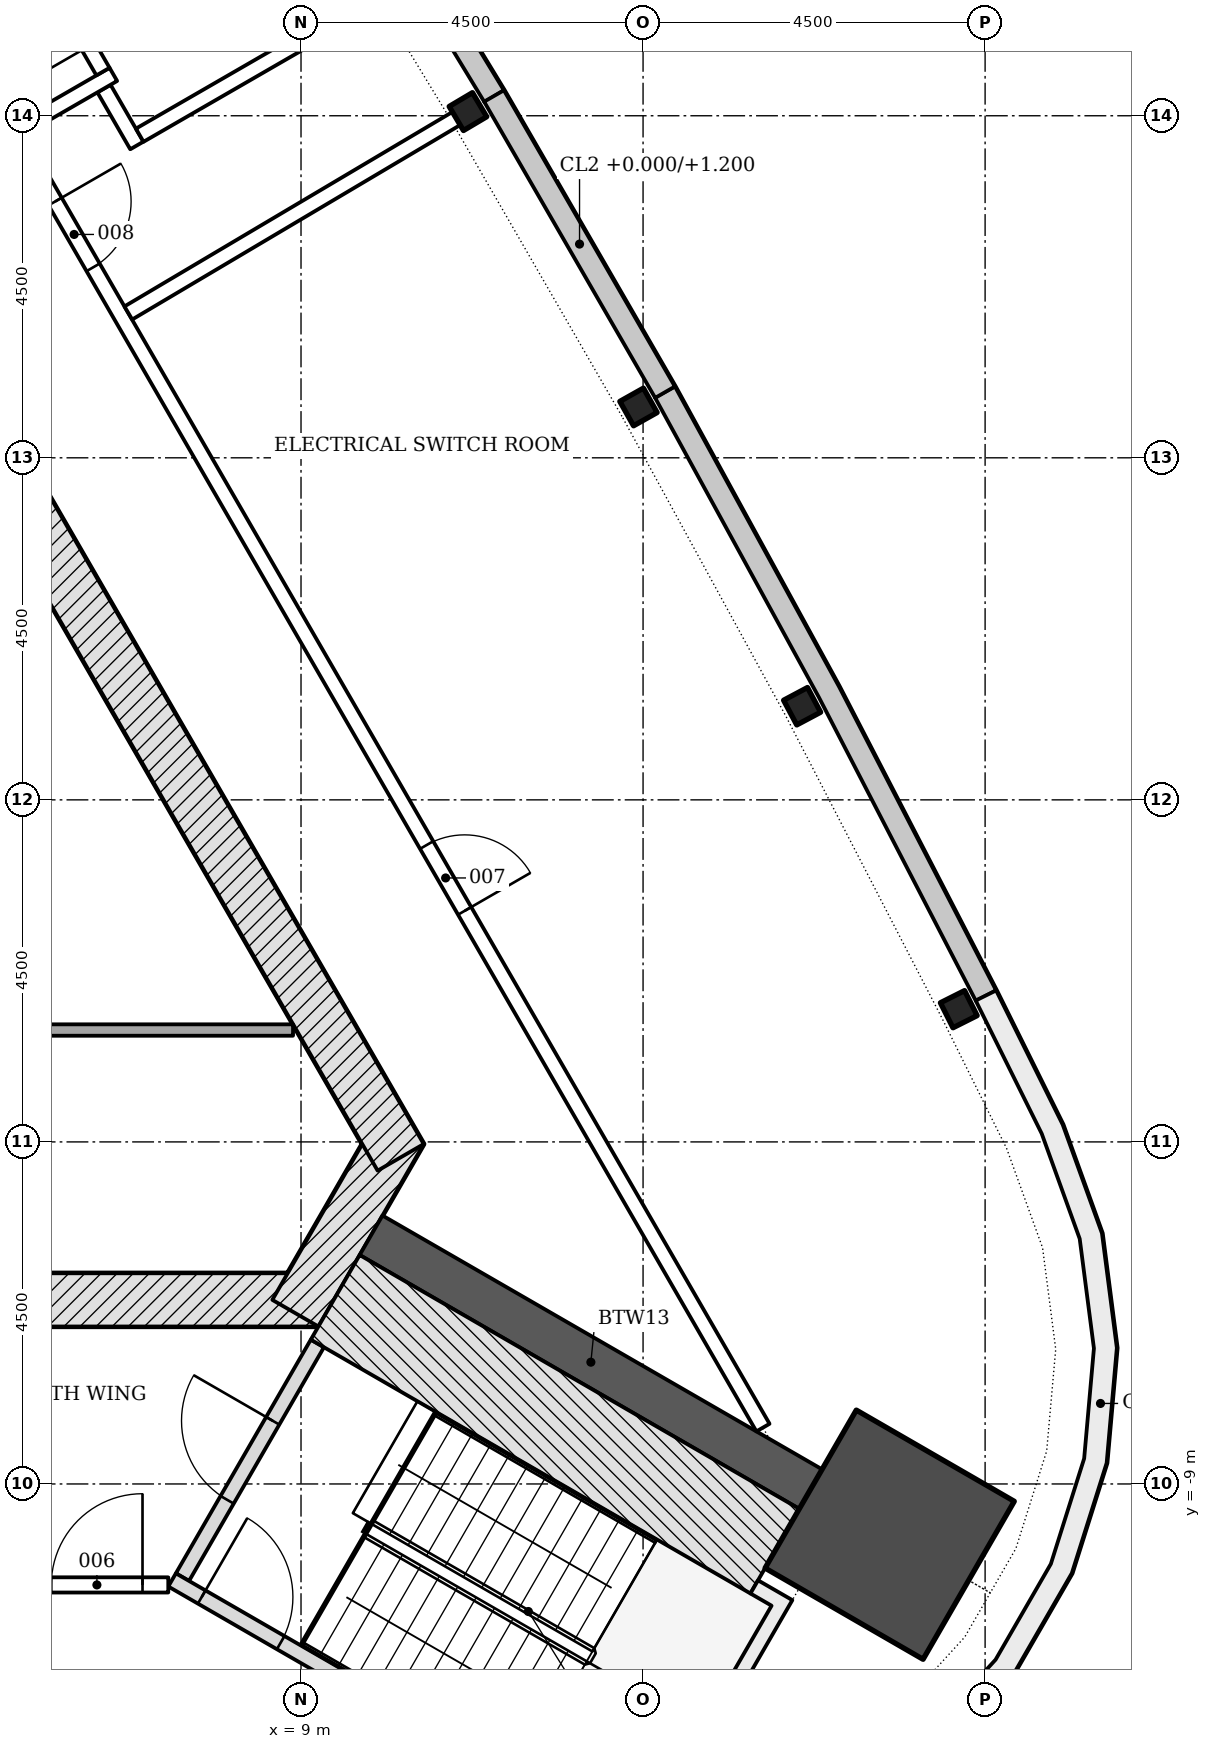
"""IFC4 building model, lengths in metres.
Left out: names, types, materials, properties, quantities, classifications, styles, units other than length and angle.
Written with IfcOpenShell. Run it as: python <this file> out.ifc"""

import sys

from ifc_helpers import new_model, si_unit, direction, frame, frame_2d, origin, origin_2d, place, context, subcontext, project, spatial, polyline, rectangle, i_section, outline, extrude, element, fill, save


model = new_model("IFC4")
c1 = context("Model", 3, precision=1e-05, world=origin(), true_north=direction((0.0, 1.0)))
c2 = subcontext(c1, "Body", "Model", "MODEL_VIEW")
j1 = project(units=[si_unit("LENGTHUNIT", "METRE"), si_unit("PLANEANGLEUNIT", "RADIAN")], contexts=[c1])
p1 = place(None, origin())
s1 = spatial("IfcSite", under=j1, at=p1, CompositionType="ELEMENT")
p2 = place(p1, origin())
s2 = spatial("IfcBuilding", under=s1, at=p2, CompositionType="ELEMENT")
p3 = place(p2, frame((0.0, 0.0, 279.6)))
s3 = spatial("IfcBuildingStorey", under=s2, at=p3, CompositionType="ELEMENT", Elevation=279.6)
p4 = place(p3, frame((-9.229, -6.578, -0.25), z_axis=(0.0, 0.0, 1.0), x_axis=(1.0, 0.0, 0.0)))
e1 = element("IfcWall", 1, at=p4, inside=s3, PredefinedType="SHEAR", context=c2, shape_type="SweptSolid", body=[
    extrude(rectangle(XDim=18.458, YDim=0.7, at=frame_2d((9.229, 0.0))), origin(), (0.0, 0.0, 1.0), 4.5),
])
p5 = place(p4, frame((8.7, 0.0, 0.25)))
e2 = element("IfcOpeningElement", 2, at=p5, cuts=e1, PredefinedType="OPENING", context=c2, shape_type="SweptSolid", body=[
    extrude(rectangle(XDim=1.0, YDim=2.1, at=frame_2d((0.5, 1.05))), frame((0.0, 0.36, 0.0), z_axis=(0.0, -1.0, 0.0), x_axis=(1.0, 0.0, 0.0)), (0.0, 0.0, 1.0), 0.72),
])
p6 = place(p4, frame((3.99, 0.0, 0.25)))
e3 = element("IfcOpeningElement", 3, at=p6, cuts=e1, PredefinedType="OPENING", context=c2, shape_type="SweptSolid", body=[
    extrude(rectangle(XDim=0.9, YDim=2.1, at=frame_2d((0.45, 1.05))), frame((0.0, 0.36, 0.0), z_axis=(0.0, -1.0, 0.0), x_axis=(1.0, 0.0, 0.0)), (0.0, 0.0, 1.0), 0.72),
])
p7 = place(p4, frame((13.539, 0.0, 0.25)))
e4 = element("IfcOpeningElement", 4, at=p7, cuts=e1, PredefinedType="OPENING", context=c2, shape_type="SweptSolid", body=[
    extrude(rectangle(XDim=0.9, YDim=2.1, at=frame_2d((0.45, 1.05))), frame((0.0, 0.36, 0.0), z_axis=(0.0, -1.0, 0.0), x_axis=(1.0, 0.0, 0.0)), (0.0, 0.0, 1.0), 0.72),
])
p8 = place(p3, frame((8.926, -6.753, -0.25), z_axis=(0.0, 0.0, 1.0), x_axis=(0.500042739161, 0.866000726912, 0.0)))
e5 = element("IfcWall", 5, at=p8, inside=s3, PredefinedType="SHEAR", context=c2, shape_type="SweptSolid", body=[
    extrude(rectangle(XDim=2.771, YDim=0.7, at=frame_2d((1.386, 0.0))), origin(), (0.0, 0.0, 1.0), 4.5),
])
p9 = place(p3, frame((10.311, -4.703, -0.25), z_axis=(0.0, 0.0, 1.0), x_axis=(-0.500001446645, 0.866024568562, 0.0)))
e6 = element("IfcWall", 6, at=p9, inside=s3, PredefinedType="SHEAR", context=c2, shape_type="SweptSolid", body=[
    extrude(rectangle(XDim=18.458, YDim=0.7, at=frame_2d((9.229, 0.0))), origin(), (0.0, 0.0, 1.0), 4.5),
])
p10 = place(p3, frame((9.922, -5.728, -0.25), z_axis=(0.0, 0.0, 1.0), x_axis=(0.866032176823, -0.499988268569, 0.0)))
e7 = element("IfcWall", 7, at=p10, inside=s3, PredefinedType="SHEAR", context=c2, shape_type="SweptSolid", body=[
    extrude(rectangle(XDim=6.678, YDim=0.6, at=frame_2d((3.339, 0.0))), origin(), (0.0, 0.0, 1.0), 4.5),
])
p11 = place(p3, frame((16.745, -9.667, -0.25), z_axis=(0.0, 0.0, 1.0), x_axis=(0.866025403784, -0.5, 0.0)))
e8 = element("IfcColumn", 8, at=p11, inside=s3, PredefinedType="COLUMN", context=c2, shape_type="SweptSolid", body=[
    extrude(rectangle(XDim=2.4, YDim=2.4, at=origin_2d()), origin(), (0.0, 0.0, 1.0), 4.5),
])
for number, where, z_axis, x_axis in (
    (9, (17.654, -2.754, -0.25), (0.0, 0.0, 1.0), (-0.449, 0.894, 0.0)),
    (10, (15.593, 1.232, -0.25), (0.0, 0.0, 1.0), (-0.47, 0.883, 0.0)),
    (11, (13.44, 5.169, -0.25), (0.0, 0.0, 1.0), (-0.49, 0.872, 0.0)),
    (12, (11.196, 9.055, -0.25), (0.0, 0.0, 1.0), (-0.51, 0.86, 0.0)),
):
    element("IfcColumn", number, at=place(p3, frame(where, z_axis=z_axis, x_axis=x_axis)), inside=s3, PredefinedType="COLUMN", context=c2, shape_type="SweptSolid", body=[
        extrude(i_section(OverallWidth=0.368, OverallDepth=0.356, WebThickness=0.011, FlangeThickness=0.018, FilletRadius=0.015, at=origin_2d()), origin(), (0.0, 0.0, 1.0), 4.5),
    ])
p12 = place(p3, origin())
e13 = element("IfcWall", 13, at=p12, inside=s3, PredefinedType="NOTDEFINED", context=c2, shape_type="SweptSolid", body=[
    extrude(outline(polyline([(18.145, -2.507), (16.078, 1.49), (13.919, 5.438), (13.656, 5.294), (15.813, 1.349), (17.878, -2.645), (18.145, -2.507)])), origin(), (0.0, 0.0, 1.0), 4.25),
])
p13 = place(p3, origin())
e14 = element("IfcWall", 14, at=p13, inside=s3, PredefinedType="NOTDEFINED", context=c2, shape_type="SweptSolid", body=[
    extrude(outline(polyline([(11.669, 9.335), (9.33, 13.179), (6.901, 16.968), (6.649, 16.806), (9.075, 13.02), (11.413, 9.179), (11.669, 9.335)])), origin(), (0.0, 0.0, 1.0), 4.25),
])
p14 = place(p3, origin())
e15 = element("IfcWall", 15, at=p14, inside=s3, PredefinedType="NOTDEFINED", context=c2, shape_type="SweptSolid", body=[
    extrude(outline(polyline([(13.919, 5.438), (11.669, 9.335), (11.409, 9.185), (13.659, 5.288), (13.919, 5.438)])), origin(), (0.0, 0.0, 1.0), 1.2),
])
p15 = place(p3, origin())
e16 = element("IfcWall", 16, at=p15, inside=s3, PredefinedType="NOTDEFINED", context=c2, shape_type="SweptSolid", body=[
    extrude(outline(polyline([(11.244, -14.46), (13.211, -14.336), (14.708, -14.069), (16.111, -13.485), (17.355, -12.611), (18.381, -11.49), (19.141, -10.174), (19.599, -8.724), (19.733, -7.21), (19.538, -5.703), (19.021, -4.273), (18.145, -2.507), (17.876, -2.64), (18.745, -4.391), (19.244, -5.774), (19.432, -7.216), (19.303, -8.665), (18.865, -10.052), (18.138, -11.312), (17.156, -12.385), (15.965, -13.22), (14.623, -13.779), (13.176, -14.038), (11.225, -14.161), (11.244, -14.46)])), origin(), (0.0, 0.0, 1.0), 4.25),
])
p16 = place(p3, frame((1.071, -3.028, 0.0), z_axis=(0.0, 0.0, 1.0), x_axis=(1.0, 0.0, 0.0)))
e17 = element("IfcWall", 17, at=p16, inside=s3, PredefinedType="PARTITIONING", context=c2, shape_type="SweptSolid", body=[
    extrude(rectangle(XDim=7.824, YDim=0.15, at=frame_2d((3.912, 0.0))), origin(), (0.0, 0.0, 1.0), 4.25),
])
p17 = place(p3, frame((7.44, -10.226, -0.25), z_axis=(0.0, 0.0, 1.0), x_axis=(0.500022077904, 0.866012656725, 0.0)))
e18 = element("IfcWall", 18, at=p17, inside=s3, PredefinedType="SHEAR", context=c2, shape_type="SweptSolid", body=[
    extrude(rectangle(XDim=3.55, YDim=0.2, at=frame_2d((1.775, 0.0))), origin(), (0.0, 0.0, 1.0), 4.5),
])
p18 = place(p17, frame((1.175, 0.0, 0.25)))
e19 = element("IfcOpeningElement", 19, at=p18, cuts=e18, PredefinedType="OPENING", context=c2, shape_type="SweptSolid", body=[
    extrude(rectangle(XDim=1.2, YDim=2.1, at=frame_2d((0.6, 1.05))), frame((0.0, 0.11, 0.0), z_axis=(0.0, -1.0, 0.0), x_axis=(1.0, 0.0, 0.0)), (0.0, 0.0, 1.0), 0.22),
])
p19 = place(p3, frame((7.304, -10.262, -0.25), z_axis=(0.0, 0.0, 1.0), x_axis=(0.866026594901, -0.49999793692, 0.0)))
e20 = element("IfcWall", 20, at=p19, inside=s3, PredefinedType="SHEAR", context=c2, shape_type="SweptSolid", body=[
    extrude(rectangle(XDim=5.6, YDim=0.2, at=frame_2d((2.8, 0.0))), origin(), (0.0, 0.0, 1.0), 4.5),
])
p20 = place(p19, frame((0.45, 0.0, 0.25)))
e21 = element("IfcOpeningElement", 21, at=p20, cuts=e20, PredefinedType="OPENING", context=c2, shape_type="SweptSolid", body=[
    extrude(rectangle(XDim=1.2, YDim=2.1, at=frame_2d((0.6, 1.05))), frame((0.0, 0.11, 0.0), z_axis=(0.0, -1.0, 0.0), x_axis=(1.0, 0.0, 0.0)), (0.0, 0.0, 1.0), 0.22),
])
p21 = place(p3, frame((9.45, -6.545, -0.25), z_axis=(0.0, 0.0, 1.0), x_axis=(0.866016347338, -0.500015685897, 0.0)))
e22 = element("IfcWall", 22, at=p21, inside=s3, PredefinedType="SHEAR", context=c2, shape_type="SweptSolid", body=[
    extrude(rectangle(XDim=6.678, YDim=1.286, at=frame_2d((3.339, 0.0))), origin(), (0.0, 0.0, 1.0), 4.5),
])
p22 = place(p3, frame((0.0, 0.0, -0.25)))
e23 = element("IfcWall", 23, at=p22, inside=s3, PredefinedType="SHEAR", context=c2, shape_type="SweptSolid", body=[
    extrude(outline(polyline([(12.104, -13.149), (14.289, -12.563), (15.464, -10.528), (15.013, -10.268), (14.913, -10.441), (15.191, -10.601), (14.157, -12.392), (12.132, -12.934), (12.204, -12.976), (12.204, -12.976), (12.204, -12.976), (12.204, -12.976), (12.204, -12.976), (12.204, -12.976), (12.204, -12.976), (12.204, -12.976), (12.204, -12.976), (12.204, -12.976), (12.204, -12.976), (12.204, -12.976), (12.204, -12.976), (12.204, -12.976), (12.204, -12.976), (12.204, -12.976), (12.204, -12.976), (12.104, -13.149)])), origin(), (0.0, 0.0, 1.0), 4.5),
])
p23 = place(p3, frame((5.1, -10.328, 0.0), z_axis=(0.0, 0.0, 1.0), x_axis=(1.0, 0.0, 0.0)))
e24 = element("IfcWall", 24, at=p23, inside=s3, PredefinedType="PARTITIONING", context=c2, shape_type="SweptSolid", body=[
    extrude(rectangle(XDim=2.154, YDim=0.2, at=frame_2d((1.077, 0.0))), origin(), (0.0, 0.0, 1.0), 3.702),
])
p24 = place(p23, frame((0.615, 0.0, 0.0)))
e25 = element("IfcOpeningElement", 25, at=p24, cuts=e24, PredefinedType="OPENING", context=c2, shape_type="SweptSolid", body=[
    extrude(rectangle(XDim=1.2, YDim=2.1, at=frame_2d((0.6, 1.05))), frame((0.0, 0.11, 0.0), z_axis=(0.0, -1.0, 0.0), x_axis=(1.0, 0.0, 0.0)), (0.0, 0.0, 1.0), 0.22),
])
p25 = place(p3, frame((6.408, 9.358, 0.0), z_axis=(0.0, 0.0, 1.0), x_axis=(0.49996696679, -0.866044474677, 0.0)))
e26 = element("IfcWall", 26, at=p25, inside=s3, PredefinedType="PARTITIONING", context=c2, shape_type="SweptSolid", body=[
    extrude(rectangle(XDim=0.864, YDim=0.2, at=frame_2d((0.432, 0.0))), origin(), (0.0, 0.0, 1.0), 4.25),
])
p26 = place(p3, frame((5.147, 8.745, 0.0), z_axis=(0.0, 0.0, 1.0), x_axis=(0.865987117328, 0.500066308224, 0.0)))
e27 = element("IfcWall", 27, at=p26, inside=s3, PredefinedType="PARTITIONING", context=c2, shape_type="SweptSolid", body=[
    extrude(rectangle(XDim=1.598, YDim=0.2, at=frame_2d((0.799, 0.0))), origin(), (0.0, 0.0, 1.0), 4.25),
])
p27 = place(p3, frame((6.395, 9.581, 0.0), z_axis=(0.0, 0.0, 1.0), x_axis=(-0.500003735859, 0.866023246874, 0.0)))
e28 = element("IfcWall", 28, at=p27, inside=s3, PredefinedType="PARTITIONING", context=c2, shape_type="SweptSolid", body=[
    extrude(rectangle(XDim=2.154, YDim=0.2, at=frame_2d((1.077, 0.0))), origin(), (0.0, 0.0, 1.0), 3.702),
])
p28 = place(p27, frame((0.383, 0.0, 0.0)))
e29 = element("IfcOpeningElement", 29, at=p28, cuts=e28, PredefinedType="OPENING", context=c2, shape_type="SweptSolid", body=[
    extrude(rectangle(XDim=1.2, YDim=2.1, at=frame_2d((0.6, 1.05))), frame((0.0, 0.11, 0.0), z_axis=(0.0, -1.0, 0.0), x_axis=(1.0, 0.0, 0.0)), (0.0, 0.0, 1.0), 0.22),
])
p29 = place(p3, frame((5.282, 8.708, 0.0), z_axis=(0.0, 0.0, 1.0), x_axis=(0.500001848211, -0.866024336717, 0.0)))
e30 = element("IfcWall", 30, at=p29, inside=s3, PredefinedType="PARTITIONING", context=c2, shape_type="SweptSolid", body=[
    extrude(rectangle(XDim=19.591, YDim=0.2, at=frame_2d((9.795, 0.0))), origin(), (0.0, 0.0, 1.0), 3.702),
])
p30 = place(p29, frame((10.741, 0.0, 0.0)))
e31 = element("IfcOpeningElement", 31, at=p30, cuts=e30, PredefinedType="OPENING", context=c2, shape_type="SweptSolid", body=[
    extrude(rectangle(XDim=1.0, YDim=2.1, at=frame_2d((0.5, 1.05))), frame((0.0, 0.11, 0.0), z_axis=(0.0, -1.0, 0.0), x_axis=(1.0, 0.0, 0.0)), (0.0, 0.0, 1.0), 0.22),
])
p31 = place(p29, frame((0.965, 0.0, 0.0)))
e32 = element("IfcOpeningElement", 32, at=p31, cuts=e30, PredefinedType="OPENING", context=c2, shape_type="SweptSolid", body=[
    extrude(rectangle(XDim=1.0, YDim=2.1, at=frame_2d((0.5, 1.05))), frame((0.0, 0.11, 0.0), z_axis=(0.0, -1.0, 0.0), x_axis=(1.0, 0.0, 0.0)), (0.0, 0.0, 1.0), 0.22),
])
p32 = place(p3, frame((6.728, 6.406, 0.0), z_axis=(0.0, 0.0, 1.0), x_axis=(0.860154706705, 0.510033215128, 0.0)))
e33 = element("IfcWall", 33, at=p32, inside=s3, PredefinedType="PARTITIONING", context=c2, shape_type="SweptSolid", body=[
    extrude(rectangle(XDim=5.044, YDim=0.2, at=frame_2d((2.522, 0.0))), origin(), (0.0, 0.0, 1.0), 3.702),
])
p33 = place(p3, frame((6.878, 8.744, 0.0), z_axis=(0.0, 0.0, 1.0), x_axis=(0.866023983177, 0.500002460556, 0.0)))
e34 = element("IfcWall", 34, at=p33, inside=s3, PredefinedType="PARTITIONING", context=c2, shape_type="SweptSolid", body=[
    extrude(rectangle(XDim=3.12, YDim=0.2, at=frame_2d((1.56, 0.0))), origin(), (0.0, 0.0, 1.0), 4.25),
])
p34 = place(p18, origin())
e35 = element("IfcDoor", 35, at=p34, inside=s3, OperationType="SINGLE_SWING_RIGHT", PredefinedType="DOOR", context=c2, shape_type="SweptSolid", body=[
    extrude(rectangle(XDim=1.2, YDim=2.1, at=frame_2d((0.6, 1.05))), frame((0.0, 0.025, 0.0), z_axis=(0.0, -1.0, 0.0), x_axis=(1.0, 0.0, 0.0)), (0.0, 0.0, 1.0), 0.05),
])
fill(e19, e35)
p35 = place(p20, origin())
e36 = element("IfcDoor", 36, at=p35, inside=s3, OperationType="SINGLE_SWING_LEFT", PredefinedType="DOOR", context=c2, shape_type="SweptSolid", body=[
    extrude(rectangle(XDim=1.2, YDim=2.1, at=frame_2d((0.6, 1.05))), frame((0.0, 0.025, 0.0), z_axis=(0.0, -1.0, 0.0), x_axis=(1.0, 0.0, 0.0)), (0.0, 0.0, 1.0), 0.05),
])
fill(e21, e36)
p36 = place(p24, origin())
e37 = element("IfcDoor", 37, at=p36, inside=s3, OperationType="SINGLE_SWING_RIGHT", PredefinedType="DOOR", context=c2, shape_type="SweptSolid", body=[
    extrude(rectangle(XDim=1.2, YDim=2.1, at=frame_2d((0.6, 1.05))), frame((0.0, 0.025, 0.0), z_axis=(0.0, -1.0, 0.0), x_axis=(1.0, 0.0, 0.0)), (0.0, 0.0, 1.0), 0.05),
])
fill(e25, e37)
p37 = place(p30, origin())
e38 = element("IfcDoor", 38, at=p37, inside=s3, OperationType="SINGLE_SWING_RIGHT", PredefinedType="DOOR", context=c2, shape_type="SweptSolid", body=[
    extrude(rectangle(XDim=1.0, YDim=2.1, at=frame_2d((0.5, 1.05))), frame((0.0, 0.025, 0.0), z_axis=(0.0, -1.0, 0.0), x_axis=(1.0, 0.0, 0.0)), (0.0, 0.0, 1.0), 0.05),
])
fill(e31, e38)
p38 = place(p31, origin())
e39 = element("IfcDoor", 39, at=p38, inside=s3, OperationType="SINGLE_SWING_LEFT", PredefinedType="DOOR", context=c2, shape_type="SweptSolid", body=[
    extrude(rectangle(XDim=1.0, YDim=2.1, at=frame_2d((0.5, 1.05))), frame((0.0, 0.025, 0.0), z_axis=(0.0, -1.0, 0.0), x_axis=(1.0, 0.0, 0.0)), (0.0, 0.0, 1.0), 0.05),
])
fill(e32, e39)
save(model, sys.argv[1])
